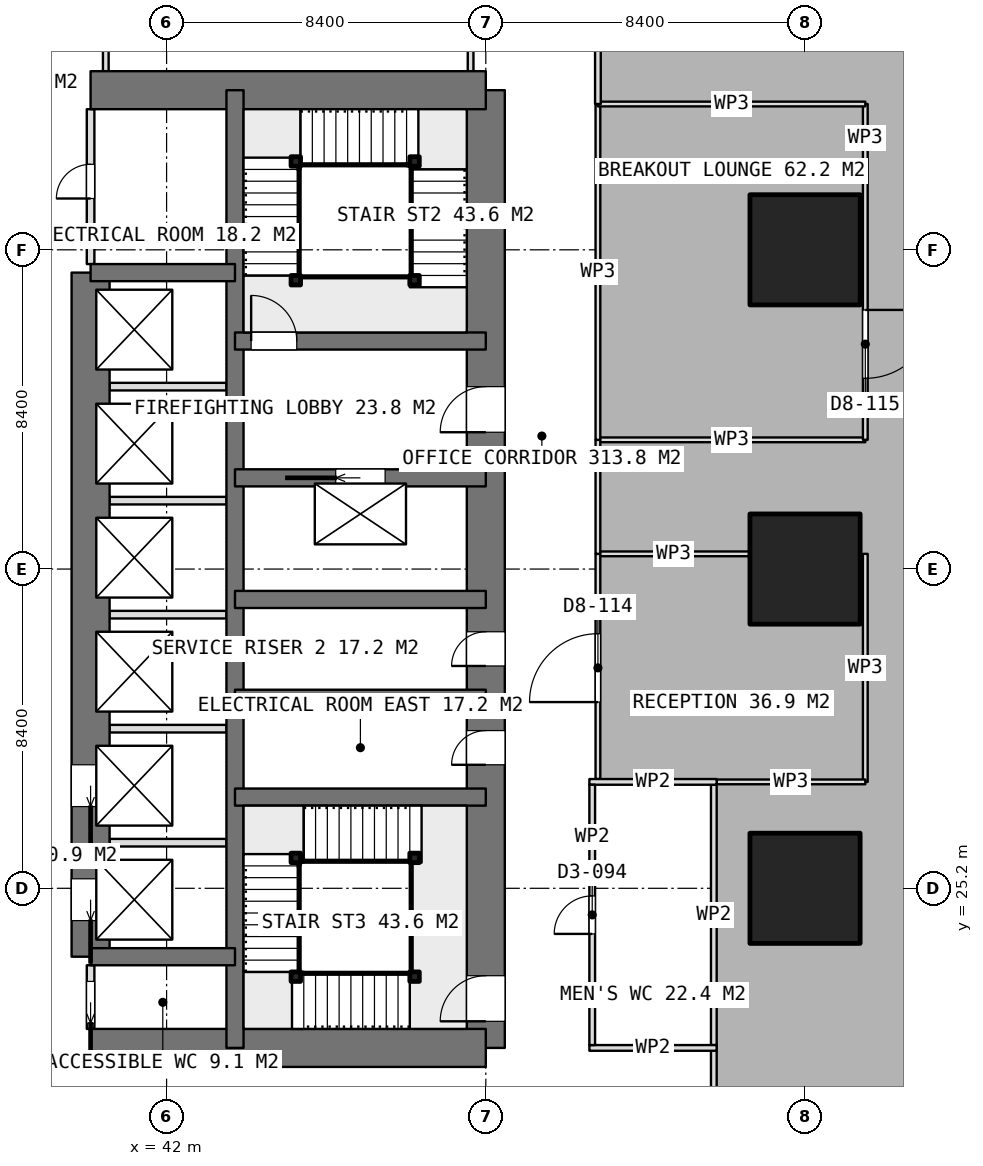
"""IFC4 building model, lengths in metres.
Left out: names, types, materials, properties, quantities, classifications, styles, units other than length and angle.
Written with IfcOpenShell. Run it as: python <this file> out.ifc"""

import sys

from ifc_helpers import new_model, si_unit, direction, frame, frame_2d, origin, origin_2d, place, context, subcontext, project, spatial, rectangle, extrude, element, fill, save


model = new_model("IFC4")
c1 = context("Model", 3, precision=1e-05, world=origin(), true_north=direction((0.0, 1.0)))
c2 = subcontext(c1, "Body", "Model", "MODEL_VIEW")
j1 = project(units=[si_unit("LENGTHUNIT", "METRE"), si_unit("PLANEANGLEUNIT", "RADIAN")], contexts=[c1])
p1 = place(None, origin())
s1 = spatial("IfcSite", under=j1, at=p1, CompositionType="ELEMENT")
p2 = place(p1, origin())
s2 = spatial("IfcBuilding", under=s1, at=p2, CompositionType="ELEMENT")
p3 = place(p2, frame((0.0, 0.0, 90.8)))
s3 = spatial("IfcBuildingStorey", under=s2, at=p3, CompositionType="ELEMENT", Elevation=90.8)
for number, where, z_axis, x_axis in (
    (1, (40.0, 21.0, 0.0), (0.0, 0.0, 1.0), (1.0, 0.0, 0.0)),
    (2, (40.0, 46.2, 0.0), (0.0, 0.0, 1.0), (1.0, 0.0, 0.0)),
):
    element("IfcWall", number, at=place(p3, frame(where, z_axis=z_axis, x_axis=x_axis)), inside=s3, PredefinedType="SHEAR", context=c2, shape_type="SweptSolid", body=[
        extrude(rectangle(XDim=10.4, YDim=1.0, at=frame_2d((5.2, 0.0))), origin(), (0.0, 0.0, 1.0), 4.5),
    ])
p4 = place(p3, frame((50.4, 21.0, 0.0), z_axis=(0.0, 0.0, 1.0), x_axis=(0.0, 1.0, 0.0)))
e3 = element("IfcWall", 3, at=p4, inside=s3, PredefinedType="SHEAR", context=c2, shape_type="SweptSolid", body=[
    extrude(rectangle(XDim=25.2, YDim=1.0, at=frame_2d((12.6, 0.0))), origin(), (0.0, 0.0, 1.0), 4.5),
])
p5 = place(p4, frame((16.2, 0.0, 0.0)))
e4 = element("IfcOpeningElement", 4, at=p5, cuts=e3, PredefinedType="OPENING", context=c2, shape_type="SweptSolid", body=[
    extrude(rectangle(XDim=1.2, YDim=2.1, at=frame_2d((0.6, 1.05))), frame((0.0, 0.51, 0.0), z_axis=(0.0, -1.0, 0.0), x_axis=(1.0, 0.0, 0.0)), (0.0, 0.0, 1.0), 1.02),
])
p6 = place(p4, frame((10.05, 0.0, 0.0)))
e5 = element("IfcOpeningElement", 5, at=p6, cuts=e3, PredefinedType="OPENING", context=c2, shape_type="SweptSolid", body=[
    extrude(rectangle(XDim=0.9, YDim=2.1, at=frame_2d((0.45, 1.05))), frame((0.0, 0.51, 0.0), z_axis=(0.0, -1.0, 0.0), x_axis=(1.0, 0.0, 0.0)), (0.0, 0.0, 1.0), 1.02),
])
p7 = place(p4, frame((7.45, 0.0, 0.0)))
e6 = element("IfcOpeningElement", 6, at=p7, cuts=e3, PredefinedType="OPENING", context=c2, shape_type="SweptSolid", body=[
    extrude(rectangle(XDim=0.9, YDim=2.1, at=frame_2d((0.45, 1.05))), frame((0.0, 0.51, 0.0), z_axis=(0.0, -1.0, 0.0), x_axis=(1.0, 0.0, 0.0)), (0.0, 0.0, 1.0), 1.02),
])
p8 = place(p4, frame((0.7, 0.0, 0.0)))
e7 = element("IfcOpeningElement", 7, at=p8, cuts=e3, PredefinedType="OPENING", context=c2, shape_type="SweptSolid", body=[
    extrude(rectangle(XDim=1.2, YDim=2.1, at=frame_2d((0.6, 1.05))), frame((0.0, 0.51, 0.0), z_axis=(0.0, -1.0, 0.0), x_axis=(1.0, 0.0, 0.0)), (0.0, 0.0, 1.0), 1.02),
])
p9 = place(p3, frame((43.8, 21.0, 0.0), z_axis=(0.0, 0.0, 1.0), x_axis=(0.0, 1.0, 0.0)))
e8 = element("IfcWall", 8, at=p9, inside=s3, PredefinedType="SHEAR", context=c2, shape_type="SweptSolid", body=[
    extrude(rectangle(XDim=25.2, YDim=0.45, at=frame_2d((12.6, 0.0))), origin(), (0.0, 0.0, 1.0), 4.5),
])
p10 = place(p3, frame((40.0, 23.4, 0.0), z_axis=(0.0, 0.0, 1.0), x_axis=(0.0, 1.0, 0.0)))
e9 = element("IfcWall", 9, at=p10, inside=s3, PredefinedType="SHEAR", context=c2, shape_type="SweptSolid", body=[
    extrude(rectangle(XDim=18.0, YDim=1.0, at=frame_2d((9.0, 0.0))), origin(), (0.0, 0.0, 1.0), 4.5),
])
p11 = place(p10, frame((0.95, 0.0, 0.0)))
e10 = element("IfcOpeningElement", 10, at=p11, cuts=e9, PredefinedType="OPENING", context=c2, shape_type="SweptSolid", body=[
    extrude(rectangle(XDim=1.1, YDim=2.1, at=frame_2d((0.55, 1.05))), frame((0.0, 0.51, 0.0), z_axis=(0.0, -1.0, 0.0), x_axis=(1.0, 0.0, 0.0)), (0.0, 0.0, 1.0), 1.02),
])
p12 = place(p10, frame((3.95, 0.0, 0.0)))
e11 = element("IfcOpeningElement", 11, at=p12, cuts=e9, PredefinedType="OPENING", context=c2, shape_type="SweptSolid", body=[
    extrude(rectangle(XDim=1.1, YDim=2.1, at=frame_2d((0.55, 1.05))), frame((0.0, 0.51, 0.0), z_axis=(0.0, -1.0, 0.0), x_axis=(1.0, 0.0, 0.0)), (0.0, 0.0, 1.0), 1.02),
])
for number, where, z_axis, x_axis in (
    (12, (40.0, 23.4, 0.0), (0.0, 0.0, 1.0), (1.0, 0.0, 0.0)),
    (13, (40.0, 41.4, 0.0), (0.0, 0.0, 1.0), (1.0, 0.0, 0.0)),
):
    element("IfcWall", number, at=place(p3, frame(where, z_axis=z_axis, x_axis=x_axis)), inside=s3, PredefinedType="SHEAR", context=c2, shape_type="SweptSolid", body=[
        extrude(rectangle(XDim=3.8, YDim=0.45, at=frame_2d((1.9, 0.0))), origin(), (0.0, 0.0, 1.0), 4.5),
    ])
for number, where, z_axis, x_axis in (
    (14, (43.8, 27.6, 0.0), (0.0, 0.0, 1.0), (1.0, 0.0, 0.0)),
    (15, (43.8, 30.2, 0.0), (0.0, 0.0, 1.0), (1.0, 0.0, 0.0)),
    (16, (43.8, 32.8, 0.0), (0.0, 0.0, 1.0), (1.0, 0.0, 0.0)),
):
    element("IfcWall", number, at=place(p3, frame(where, z_axis=z_axis, x_axis=x_axis)), inside=s3, PredefinedType="SHEAR", context=c2, shape_type="SweptSolid", body=[
        extrude(rectangle(XDim=6.6, YDim=0.45, at=frame_2d((3.3, 0.0))), origin(), (0.0, 0.0, 1.0), 4.5),
    ])
p13 = place(p3, frame((43.8, 36.0, 0.0), z_axis=(0.0, 0.0, 1.0), x_axis=(1.0, 0.0, 0.0)))
e17 = element("IfcWall", 17, at=p13, inside=s3, PredefinedType="SHEAR", context=c2, shape_type="SweptSolid", body=[
    extrude(rectangle(XDim=6.6, YDim=0.45, at=frame_2d((3.3, 0.0))), origin(), (0.0, 0.0, 1.0), 4.5),
])
p14 = place(p13, frame((2.65, 0.0, 0.0)))
e18 = element("IfcOpeningElement", 18, at=p14, cuts=e17, PredefinedType="OPENING", context=c2, shape_type="SweptSolid", body=[
    extrude(rectangle(XDim=1.3, YDim=2.1, at=frame_2d((0.65, 1.05))), frame((0.0, 0.235, 0.0), z_axis=(0.0, -1.0, 0.0), x_axis=(1.0, 0.0, 0.0)), (0.0, 0.0, 1.0), 0.47),
])
p15 = place(p3, frame((43.8, 39.6, 0.0), z_axis=(0.0, 0.0, 1.0), x_axis=(1.0, 0.0, 0.0)))
e19 = element("IfcWall", 19, at=p15, inside=s3, PredefinedType="SHEAR", context=c2, shape_type="SweptSolid", body=[
    extrude(rectangle(XDim=6.6, YDim=0.45, at=frame_2d((3.3, 0.0))), origin(), (0.0, 0.0, 1.0), 4.5),
])
p16 = place(p15, frame((0.425, 0.0, 0.0)))
e20 = element("IfcOpeningElement", 20, at=p16, cuts=e19, PredefinedType="OPENING", context=c2, shape_type="SweptSolid", body=[
    extrude(rectangle(XDim=1.2, YDim=2.1, at=frame_2d((0.6, 1.05))), frame((0.0, 0.235, 0.0), z_axis=(0.0, -1.0, 0.0), x_axis=(1.0, 0.0, 0.0)), (0.0, 0.0, 1.0), 0.47),
])
for number, where, z_axis, x_axis in (
    (21, (58.8, 25.2, 0.0), (0.0, 0.0, 1.0), (1.0, 0.0, 0.0)),
    (22, (58.8, 33.6, 0.0), (0.0, 0.0, 1.0), (1.0, 0.0, 0.0)),
    (23, (58.8, 42.0, 0.0), (0.0, 0.0, 1.0), (1.0, 0.0, 0.0)),
):
    element("IfcColumn", number, at=place(p3, frame(where, z_axis=z_axis, x_axis=x_axis)), inside=s3, PredefinedType="COLUMN", context=c2, shape_type="SweptSolid", body=[
        extrude(rectangle(XDim=2.9, YDim=2.9, at=origin_2d()), origin(), (0.0, 0.0, 1.0), 4.5),
    ])
for number, where, z_axis, x_axis in (
    (24, (40.5, 26.4, 0.0), (0.0, 0.0, 1.0), (1.0, 0.0, 0.0)),
    (25, (40.5, 29.4, 0.0), (0.0, 0.0, 1.0), (1.0, 0.0, 0.0)),
    (26, (40.5, 32.4, 0.0), (0.0, 0.0, 1.0), (1.0, 0.0, 0.0)),
    (27, (40.5, 35.4, 0.0), (0.0, 0.0, 1.0), (1.0, 0.0, 0.0)),
    (28, (40.5, 38.4, 0.0), (0.0, 0.0, 1.0), (1.0, 0.0, 0.0)),
):
    element("IfcWall", number, at=place(p3, frame(where, z_axis=z_axis, x_axis=x_axis)), inside=s3, PredefinedType="PARTITIONING", context=c2, shape_type="SweptSolid", body=[
        extrude(rectangle(XDim=3.075, YDim=0.2, at=frame_2d((1.538, 0.0))), origin(), (0.0, 0.0, 1.0), 4.25),
    ])
p17 = place(p3, frame((40.0, 21.5, 0.0), z_axis=(0.0, 0.0, 1.0), x_axis=(0.0, 1.0, 0.0)))
e29 = element("IfcWall", 29, at=p17, inside=s3, PredefinedType="PARTITIONING", context=c2, shape_type="SweptSolid", body=[
    extrude(rectangle(XDim=1.675, YDim=0.2, at=frame_2d((0.837, 0.0))), origin(), (0.0, 0.0, 1.0), 4.25),
])
p18 = place(p17, frame((0.15, 0.0, 0.0)))
e30 = element("IfcOpeningElement", 30, at=p18, cuts=e29, PredefinedType="OPENING", context=c2, shape_type="SweptSolid", body=[
    extrude(rectangle(XDim=1.1, YDim=2.1, at=frame_2d((0.55, 1.05))), frame((0.0, 0.11, 0.0), z_axis=(0.0, -1.0, 0.0), x_axis=(1.0, 0.0, 0.0)), (0.0, 0.0, 1.0), 0.22),
])
p19 = place(p3, frame((40.0, 41.625, 0.0), z_axis=(0.0, 0.0, 1.0), x_axis=(0.0, 1.0, 0.0)))
e31 = element("IfcWall", 31, at=p19, inside=s3, PredefinedType="PARTITIONING", context=c2, shape_type="SweptSolid", body=[
    extrude(rectangle(XDim=4.075, YDim=0.2, at=frame_2d((2.038, 0.0))), origin(), (0.0, 0.0, 1.0), 4.25),
])
p20 = place(p19, frame((1.725, 0.0, 0.0)))
e32 = element("IfcOpeningElement", 32, at=p20, cuts=e31, PredefinedType="OPENING", context=c2, shape_type="SweptSolid", body=[
    extrude(rectangle(XDim=0.9, YDim=2.1, at=frame_2d((0.45, 1.05))), frame((0.0, 0.11, 0.0), z_axis=(0.0, -1.0, 0.0), x_axis=(1.0, 0.0, 0.0)), (0.0, 0.0, 1.0), 0.22),
])
for number, where, z_axis, x_axis in (
    (33, (40.4, 46.7, 0.0), (0.0, 0.0, 1.0), (0.0, 1.0, 0.0)),
    (34, (50.0, 46.7, 0.0), (0.0, 0.0, 1.0), (0.0, 1.0, 0.0)),
):
    element("IfcWall", number, at=place(p3, frame(where, z_axis=z_axis, x_axis=x_axis)), inside=s3, PredefinedType="PARTITIONING", context=c2, shape_type="SweptSolid", body=[
        extrude(rectangle(XDim=2.625, YDim=0.15, at=frame_2d((1.312, 0.0))), origin(), (0.0, 0.0, 1.0), 4.25),
    ])
for number, where, z_axis, x_axis in (
    (35, (53.125, 21.0, 0.0), (0.0, 0.0, 1.0), (1.0, 0.0, 0.0)),
    (36, (53.125, 28.0, 0.0), (0.0, 0.0, 1.0), (1.0, 0.0, 0.0)),
):
    element("IfcWall", number, at=place(p3, frame(where, z_axis=z_axis, x_axis=x_axis)), inside=s3, PredefinedType="PARTITIONING", context=c2, shape_type="SweptSolid", body=[
        extrude(rectangle(XDim=3.35, YDim=0.15, at=frame_2d((1.675, 0.0))), origin(), (0.0, 0.0, 1.0), 4.25),
    ])
p21 = place(p3, frame((53.2, 21.075, 0.0), z_axis=(0.0, 0.0, 1.0), x_axis=(0.0, 1.0, 0.0)))
e37 = element("IfcWall", 37, at=p21, inside=s3, PredefinedType="PARTITIONING", context=c2, shape_type="SweptSolid", body=[
    extrude(rectangle(XDim=6.85, YDim=0.15, at=frame_2d((3.425, 0.0))), origin(), (0.0, 0.0, 1.0), 4.25),
])
p22 = place(p21, frame((2.925, 0.0, 0.0)))
e38 = element("IfcOpeningElement", 38, at=p22, cuts=e37, PredefinedType="OPENING", context=c2, shape_type="SweptSolid", body=[
    extrude(rectangle(XDim=1.0, YDim=2.1, at=frame_2d((0.5, 1.05))), frame((0.0, 0.085, 0.0), z_axis=(0.0, -1.0, 0.0), x_axis=(1.0, 0.0, 0.0)), (0.0, 0.0, 1.0), 0.17),
])
p23 = place(p3, frame((56.4, 21.075, 0.0), z_axis=(0.0, 0.0, 1.0), x_axis=(0.0, 1.0, 0.0)))
e39 = element("IfcWall", 39, at=p23, inside=s3, PredefinedType="PARTITIONING", context=c2, shape_type="SweptSolid", body=[
    extrude(rectangle(XDim=6.85, YDim=0.15, at=frame_2d((3.425, 0.0))), origin(), (0.0, 0.0, 1.0), 4.25),
])
p24 = place(p3, frame((53.35, 34.0, 0.0), z_axis=(0.0, 0.0, 1.0), x_axis=(1.0, 0.0, 0.0)))
e40 = element("IfcWall", 40, at=p24, inside=s3, PredefinedType="PARTITIONING", context=c2, shape_type="SweptSolid", body=[
    extrude(rectangle(XDim=3.98, YDim=0.125, at=frame_2d((1.99, 0.0))), origin(), (0.0, 0.0, 1.0), 4.25),
])
p25 = place(p3, frame((60.386, 34.0, 0.0), z_axis=(0.0, 0.0, 1.0), x_axis=(0.0, -1.0, 0.0)))
e41 = element("IfcWall", 41, at=p25, inside=s3, PredefinedType="PARTITIONING", context=c2, shape_type="SweptSolid", body=[
    extrude(rectangle(XDim=6.0, YDim=0.125, at=frame_2d((3.0, 0.0))), origin(), (0.0, 0.0, 1.0), 4.25),
])
p26 = place(p3, frame((60.386, 28.0, 0.0), z_axis=(0.0, 0.0, 1.0), x_axis=(-1.0, 0.0, 0.0)))
e42 = element("IfcWall", 42, at=p26, inside=s3, PredefinedType="PARTITIONING", context=c2, shape_type="SweptSolid", body=[
    extrude(rectangle(XDim=3.911, YDim=0.125, at=frame_2d((1.956, 0.0))), origin(), (0.0, 0.0, 1.0), 4.25),
])
p27 = place(p3, frame((53.35, 28.075, 0.0), z_axis=(0.0, 0.0, 1.0), x_axis=(0.0, 1.0, 0.0)))
e43 = element("IfcWall", 43, at=p27, inside=s3, PredefinedType="PARTITIONING", context=c2, shape_type="SweptSolid", body=[
    extrude(rectangle(XDim=5.925, YDim=0.125, at=frame_2d((2.962, 0.0))), origin(), (0.0, 0.0, 1.0), 4.25),
])
p28 = place(p27, frame((2.025, 0.0, 0.0)))
e44 = element("IfcOpeningElement", 44, at=p28, cuts=e43, PredefinedType="OPENING", context=c2, shape_type="SweptSolid", body=[
    extrude(rectangle(XDim=1.8, YDim=2.1, at=frame_2d((0.9, 1.05))), frame((0.0, 0.073, 0.0), z_axis=(0.0, -1.0, 0.0), x_axis=(1.0, 0.0, 0.0)), (0.0, 0.0, 1.0), 0.145),
])
p29 = place(p3, frame((53.35, 37.0, 0.0), z_axis=(0.0, 0.0, 1.0), x_axis=(1.0, 0.0, 0.0)))
e45 = element("IfcWall", 45, at=p29, inside=s3, PredefinedType="PARTITIONING", context=c2, shape_type="SweptSolid", body=[
    extrude(rectangle(XDim=7.036, YDim=0.125, at=frame_2d((3.518, 0.0))), origin(), (0.0, 0.0, 1.0), 4.25),
])
p30 = place(p3, frame((53.35, 34.0, 0.0), z_axis=(0.0, 0.0, 1.0), x_axis=(0.0, 1.0, 0.0)))
e46 = element("IfcWall", 46, at=p30, inside=s3, PredefinedType="PARTITIONING", context=c2, shape_type="SweptSolid", body=[
    extrude(rectangle(XDim=3.0, YDim=0.125, at=frame_2d((1.5, 0.0))), origin(), (0.0, 0.0, 1.0), 4.25),
])
p31 = place(p3, frame((60.386, 45.836, 0.0), z_axis=(0.0, 0.0, 1.0), x_axis=(0.0, -1.0, 0.0)))
e47 = element("IfcWall", 47, at=p31, inside=s3, PredefinedType="PARTITIONING", context=c2, shape_type="SweptSolid", body=[
    extrude(rectangle(XDim=8.836, YDim=0.125, at=frame_2d((4.418, 0.0))), origin(), (0.0, 0.0, 1.0), 4.25),
])
p32 = place(p31, frame((5.418, 0.0, 0.0)))
e48 = element("IfcOpeningElement", 48, at=p32, cuts=e47, PredefinedType="OPENING", context=c2, shape_type="SweptSolid", body=[
    extrude(rectangle(XDim=1.8, YDim=2.1, at=frame_2d((0.9, 1.05))), frame((0.0, 0.073, 0.0), z_axis=(0.0, -1.0, 0.0), x_axis=(1.0, 0.0, 0.0)), (0.0, 0.0, 1.0), 0.145),
])
p33 = place(p3, frame((53.35, 37.0, 0.0), z_axis=(0.0, 0.0, 1.0), x_axis=(0.0, 1.0, 0.0)))
e49 = element("IfcWall", 49, at=p33, inside=s3, PredefinedType="PARTITIONING", context=c2, shape_type="SweptSolid", body=[
    extrude(rectangle(XDim=8.836, YDim=0.125, at=frame_2d((4.418, 0.0))), origin(), (0.0, 0.0, 1.0), 4.25),
])
p34 = place(p3, frame((53.35, 45.836, 0.0), z_axis=(0.0, 0.0, 1.0), x_axis=(1.0, 0.0, 0.0)))
e50 = element("IfcWall", 50, at=p34, inside=s3, PredefinedType="PARTITIONING", context=c2, shape_type="SweptSolid", body=[
    extrude(rectangle(XDim=7.036, YDim=0.125, at=frame_2d((3.518, 0.0))), origin(), (0.0, 0.0, 1.0), 4.25),
])
p35 = place(p3, frame((53.35, 45.836, 0.0), z_axis=(0.0, 0.0, 1.0), x_axis=(0.0, 1.0, 0.0)))
e51 = element("IfcWall", 51, at=p35, inside=s3, PredefinedType="PARTITIONING", context=c2, shape_type="SweptSolid", body=[
    extrude(rectangle(XDim=7.514, YDim=0.15, at=frame_2d((3.757, 0.0))), origin(), (0.0, 0.0, 1.0), 4.25),
])
p36 = place(p3, frame((56.4, 19.513, 0.0), z_axis=(0.0, 0.0, 1.0), x_axis=(0.0, 1.0, 0.0)))
e52 = element("IfcWall", 52, at=p36, inside=s3, PredefinedType="PARTITIONING", context=c2, shape_type="SweptSolid", body=[
    extrude(rectangle(XDim=1.562, YDim=0.15, at=frame_2d((0.781, 0.0))), origin(), (0.0, 0.0, 1.0), 4.25),
])
for number, where, z_axis, x_axis in (
    (53, (45.4, 41.2, 0.0), (0.0, 0.0, 1.0), (1.0, 0.0, 0.0)),
    (54, (45.4, 44.325, 0.0), (0.0, 0.0, 1.0), (1.0, 0.0, 0.0)),
    (55, (48.525, 44.325, 0.0), (0.0, 0.0, 1.0), (1.0, 0.0, 0.0)),
    (56, (48.525, 41.2, 0.0), (0.0, 0.0, 1.0), (1.0, 0.0, 0.0)),
    (57, (48.525, 22.875, 0.0), (0.0, 0.0, 1.0), (1.0, 0.0, 0.0)),
    (58, (45.4, 22.875, 0.0), (0.0, 0.0, 1.0), (1.0, 0.0, 0.0)),
    (59, (45.4, 26.0, 0.0), (0.0, 0.0, 1.0), (1.0, 0.0, 0.0)),
    (60, (48.525, 26.0, 0.0), (0.0, 0.0, 1.0), (1.0, 0.0, 0.0)),
):
    element("IfcColumn", number, at=place(p3, frame(where, z_axis=z_axis, x_axis=x_axis)), inside=s3, PredefinedType="COLUMN", context=c2, shape_type="SweptSolid", body=[
        extrude(rectangle(XDim=0.25, YDim=0.25, at=origin_2d()), origin(), (0.0, 0.0, 1.0), 4.5),
    ])
p37 = place(p5, origin())
e61 = element("IfcDoor", 61, at=p37, inside=s3, OperationType="SINGLE_SWING_LEFT", PredefinedType="DOOR", context=c2, shape_type="SweptSolid", body=[
    extrude(rectangle(XDim=1.2, YDim=2.1, at=frame_2d((0.6, 1.05))), frame((0.0, 0.025, 0.0), z_axis=(0.0, -1.0, 0.0), x_axis=(1.0, 0.0, 0.0)), (0.0, 0.0, 1.0), 0.05),
])
fill(e4, e61)
p38 = place(p6, origin())
e62 = element("IfcDoor", 62, at=p38, inside=s3, OperationType="SINGLE_SWING_LEFT", PredefinedType="DOOR", context=c2, shape_type="SweptSolid", body=[
    extrude(rectangle(XDim=0.9, YDim=2.1, at=frame_2d((0.45, 1.05))), frame((0.0, 0.025, 0.0), z_axis=(0.0, -1.0, 0.0), x_axis=(1.0, 0.0, 0.0)), (0.0, 0.0, 1.0), 0.05),
])
fill(e5, e62)
p39 = place(p7, origin())
e63 = element("IfcDoor", 63, at=p39, inside=s3, OperationType="SINGLE_SWING_LEFT", PredefinedType="DOOR", context=c2, shape_type="SweptSolid", body=[
    extrude(rectangle(XDim=0.9, YDim=2.1, at=frame_2d((0.45, 1.05))), frame((0.0, 0.025, 0.0), z_axis=(0.0, -1.0, 0.0), x_axis=(1.0, 0.0, 0.0)), (0.0, 0.0, 1.0), 0.05),
])
fill(e6, e63)
p40 = place(p18, origin())
e64 = element("IfcDoor", 64, at=p40, inside=s3, OperationType="SLIDING_TO_LEFT", PredefinedType="DOOR", context=c2, shape_type="SweptSolid", body=[
    extrude(rectangle(XDim=1.1, YDim=2.1, at=frame_2d((0.55, 1.05))), frame((0.0, 0.025, 0.0), z_axis=(0.0, -1.0, 0.0), x_axis=(1.0, 0.0, 0.0)), (0.0, 0.0, 1.0), 0.05),
])
fill(e30, e64)
p41 = place(p20, origin())
e65 = element("IfcDoor", 65, at=p41, inside=s3, OperationType="SINGLE_SWING_LEFT", PredefinedType="DOOR", context=c2, shape_type="SweptSolid", body=[
    extrude(rectangle(XDim=0.9, YDim=2.1, at=frame_2d((0.45, 1.05))), frame((0.0, 0.025, 0.0), z_axis=(0.0, -1.0, 0.0), x_axis=(1.0, 0.0, 0.0)), (0.0, 0.0, 1.0), 0.05),
])
fill(e32, e65)
p42 = place(p14, origin())
e66 = element("IfcDoor", 66, at=p42, inside=s3, OperationType="SLIDING_TO_LEFT", PredefinedType="USERDEFINED", context=c2, shape_type="SweptSolid", body=[
    extrude(rectangle(XDim=1.3, YDim=2.1, at=frame_2d((0.65, 1.05))), frame((0.0, 0.025, 0.0), z_axis=(0.0, -1.0, 0.0), x_axis=(1.0, 0.0, 0.0)), (0.0, 0.0, 1.0), 0.05),
])
fill(e18, e66)
p43 = place(p11, origin())
e67 = element("IfcDoor", 67, at=p43, inside=s3, OperationType="SLIDING_TO_LEFT", PredefinedType="USERDEFINED", context=c2, shape_type="SweptSolid", body=[
    extrude(rectangle(XDim=1.1, YDim=2.1, at=frame_2d((0.55, 1.05))), frame((0.0, 0.025, 0.0), z_axis=(0.0, -1.0, 0.0), x_axis=(1.0, 0.0, 0.0)), (0.0, 0.0, 1.0), 0.05),
])
fill(e10, e67)
p44 = place(p12, origin())
e68 = element("IfcDoor", 68, at=p44, inside=s3, OperationType="SLIDING_TO_LEFT", PredefinedType="USERDEFINED", context=c2, shape_type="SweptSolid", body=[
    extrude(rectangle(XDim=1.1, YDim=2.1, at=frame_2d((0.55, 1.05))), frame((0.0, 0.025, 0.0), z_axis=(0.0, -1.0, 0.0), x_axis=(1.0, 0.0, 0.0)), (0.0, 0.0, 1.0), 0.05),
])
fill(e11, e68)
p45 = place(p22, origin())
e69 = element("IfcDoor", 69, at=p45, inside=s3, OperationType="SINGLE_SWING_LEFT", PredefinedType="DOOR", context=c2, shape_type="SweptSolid", body=[
    extrude(rectangle(XDim=1.0, YDim=2.1, at=frame_2d((0.5, 1.05))), frame((0.0, 0.025, 0.0), z_axis=(0.0, -1.0, 0.0), x_axis=(1.0, 0.0, 0.0)), (0.0, 0.0, 1.0), 0.05),
])
fill(e38, e69)
p46 = place(p28, origin())
e70 = element("IfcDoor", 70, at=p46, inside=s3, OperationType="DOUBLE_DOOR_SINGLE_SWING", PredefinedType="DOOR", context=c2, shape_type="SweptSolid", body=[
    extrude(rectangle(XDim=1.8, YDim=2.1, at=frame_2d((0.9, 1.05))), frame((0.0, 0.025, 0.0), z_axis=(0.0, -1.0, 0.0), x_axis=(1.0, 0.0, 0.0)), (0.0, 0.0, 1.0), 0.05),
])
fill(e44, e70)
p47 = place(p32, origin())
e71 = element("IfcDoor", 71, at=p47, inside=s3, OperationType="DOUBLE_DOOR_SINGLE_SWING", PredefinedType="DOOR", context=c2, shape_type="SweptSolid", body=[
    extrude(rectangle(XDim=1.8, YDim=2.1, at=frame_2d((0.9, 1.05))), frame((0.0, 0.025, 0.0), z_axis=(0.0, -1.0, 0.0), x_axis=(1.0, 0.0, 0.0)), (0.0, 0.0, 1.0), 0.05),
])
fill(e48, e71)
p48 = place(p16, origin())
e72 = element("IfcDoor", 72, at=p48, inside=s3, OperationType="SINGLE_SWING_RIGHT", PredefinedType="DOOR", context=c2, shape_type="SweptSolid", body=[
    extrude(rectangle(XDim=1.2, YDim=2.1, at=frame_2d((0.6, 1.05))), frame((0.0, 0.025, 0.0), z_axis=(0.0, -1.0, 0.0), x_axis=(1.0, 0.0, 0.0)), (0.0, 0.0, 1.0), 0.05),
])
fill(e20, e72)
p49 = place(p8, origin())
e73 = element("IfcDoor", 73, at=p49, inside=s3, OperationType="SINGLE_SWING_RIGHT", PredefinedType="DOOR", context=c2, shape_type="SweptSolid", body=[
    extrude(rectangle(XDim=1.2, YDim=2.1, at=frame_2d((0.6, 1.05))), frame((0.0, 0.025, 0.0), z_axis=(0.0, -1.0, 0.0), x_axis=(1.0, 0.0, 0.0)), (0.0, 0.0, 1.0), 0.05),
])
fill(e7, e73)
save(model, sys.argv[1])
